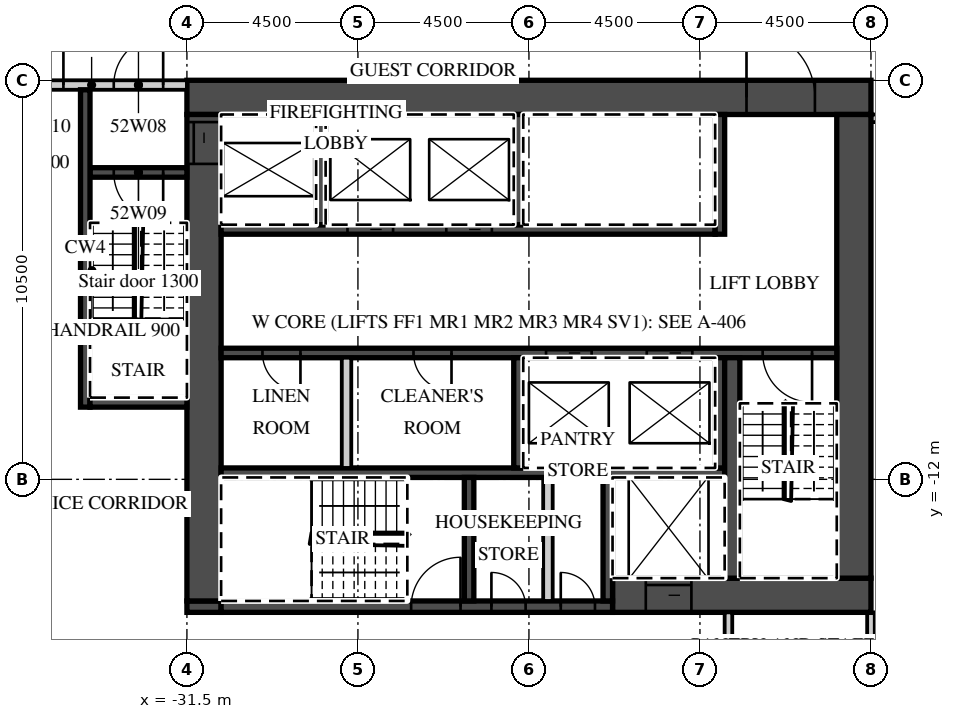
"""IFC4 building model, lengths in metres.
Left out: names, types, materials, properties, quantities, classifications, styles, units other than length and angle.
Written with IfcOpenShell. Run it as: python <this file> out.ifc"""

import sys

from ifc_helpers import new_model, si_unit, direction, frame, frame_2d, origin, place, context, subcontext, project, spatial, rectangle, extrude, element, fill, save


model = new_model("IFC4")
c1 = context("Model", 3, precision=1e-05, world=origin(), true_north=direction((0.0, 1.0)))
c2 = subcontext(c1, "Body", "Model", "MODEL_VIEW")
j1 = project(units=[si_unit("LENGTHUNIT", "METRE"), si_unit("PLANEANGLEUNIT", "RADIAN")], contexts=[c1])
p1 = place(None, origin())
s1 = spatial("IfcSite", under=j1, at=p1, CompositionType="ELEMENT")
p2 = place(p1, origin())
s2 = spatial("IfcBuilding", under=s1, at=p2, CompositionType="ELEMENT")
p3 = place(p2, frame((0.0, 0.0, 217.7)))
s3 = spatial("IfcBuildingStorey", under=s2, at=p3, CompositionType="ELEMENT", Elevation=217.7)
p4 = place(p3, frame((-13.5, -19.641, 0.0), z_axis=(0.0, 0.0, 1.0), x_axis=(0.0, 1.0, 0.0)))
e1 = element("IfcWall", 1, at=p4, inside=s3, PredefinedType="PARTITIONING", context=c2, shape_type="SweptSolid", body=[
    extrude(rectangle(XDim=4.141, YDim=0.2, at=frame_2d((2.071, 0.0))), origin(), (0.0, 0.0, 1.0), 3.02),
])
p5 = place(p3, frame((-13.5, -2.5, 0.0), z_axis=(0.0, 0.0, 1.0), x_axis=(1.0, 0.0, 0.0)))
e2 = element("IfcWall", 2, at=p5, inside=s3, PredefinedType="PARTITIONING", context=c2, shape_type="SweptSolid", body=[
    extrude(rectangle(XDim=27.0, YDim=0.2, at=frame_2d((13.5, 0.0))), origin(), (0.0, 0.0, 1.0), 3.02),
])
p6 = place(p5, frame((0.575, 0.0, 0.0)))
e3 = element("IfcOpeningElement", 3, at=p6, cuts=e2, PredefinedType="OPENING", context=c2, shape_type="SweptSolid", body=[
    extrude(rectangle(XDim=1.0, YDim=2.1, at=frame_2d((0.5, 1.05))), frame((0.0, 0.11, 0.0), z_axis=(0.0, -1.0, 0.0), x_axis=(1.0, 0.0, 0.0)), (0.0, 0.0, 1.0), 0.22),
])
p7 = place(p5, frame((6.938, 0.0, 0.0)))
e4 = element("IfcOpeningElement", 4, at=p7, cuts=e2, PredefinedType="OPENING", context=c2, shape_type="SweptSolid", body=[
    extrude(rectangle(XDim=1.2, YDim=2.1, at=frame_2d((0.6, 1.05))), frame((0.0, 0.11, 0.0), z_axis=(0.0, -1.0, 0.0), x_axis=(1.0, 0.0, 0.0)), (0.0, 0.0, 1.0), 0.22),
])
p8 = place(p5, frame((15.938, 0.0, 0.0)))
e5 = element("IfcOpeningElement", 5, at=p8, cuts=e2, PredefinedType="OPENING", context=c2, shape_type="SweptSolid", body=[
    extrude(rectangle(XDim=1.2, YDim=2.1, at=frame_2d((0.6, 1.05))), frame((0.0, 0.11, 0.0), z_axis=(0.0, -1.0, 0.0), x_axis=(1.0, 0.0, 0.0)), (0.0, 0.0, 1.0), 0.22),
])
p9 = place(p5, frame((25.425, 0.0, 0.0)))
e6 = element("IfcOpeningElement", 6, at=p9, cuts=e2, PredefinedType="OPENING", context=c2, shape_type="SweptSolid", body=[
    extrude(rectangle(XDim=1.0, YDim=2.1, at=frame_2d((0.5, 1.05))), frame((0.0, 0.11, 0.0), z_axis=(0.0, -1.0, 0.0), x_axis=(1.0, 0.0, 0.0)), (0.0, 0.0, 1.0), 0.22),
])
p10 = place(p3, frame((-31.5, -1.95, 0.0), z_axis=(0.0, 0.0, 1.0), x_axis=(1.0, 0.0, 0.0)))
e7 = element("IfcWall", 7, at=p10, inside=s3, PredefinedType="SHEAR", context=c2, shape_type="SweptSolid", body=[
    extrude(rectangle(XDim=18.0, YDim=0.9, at=frame_2d((9.0, 0.0))), origin(), (0.0, 0.0, 1.0), 3.02),
])
p11 = place(p10, frame((14.725, 0.0, 0.0)))
e8 = element("IfcOpeningElement", 8, at=p11, cuts=e7, PredefinedType="OPENING", context=c2, shape_type="SweptSolid", body=[
    extrude(rectangle(XDim=1.8, YDim=2.1, at=frame_2d((0.9, 1.05))), frame((0.0, 0.46, 0.0), z_axis=(0.0, -1.0, 0.0), x_axis=(1.0, 0.0, 0.0)), (0.0, 0.0, 1.0), 0.92),
])
p12 = place(p3, frame((-20.3, -15.05, 0.0), z_axis=(0.0, 0.0, 1.0), x_axis=(1.0, 0.0, 0.0)))
e9 = element("IfcWall", 9, at=p12, inside=s3, PredefinedType="SHEAR", context=c2, shape_type="SweptSolid", body=[
    extrude(rectangle(XDim=6.8, YDim=0.9, at=frame_2d((3.4, 0.0))), origin(), (0.0, 0.0, 1.0), 3.02),
])
p13 = place(p12, frame((0.875, 0.0, 0.0)))
e10 = element("IfcOpeningElement", 10, at=p13, cuts=e9, PredefinedType="OPENING", context=c2, shape_type="SweptSolid", body=[
    extrude(rectangle(XDim=1.2, YDim=2.1, at=frame_2d((0.6, 1.05))), frame((0.0, 0.46, 0.0), z_axis=(0.0, -1.0, 0.0), x_axis=(1.0, 0.0, 0.0)), (0.0, 0.0, 1.0), 0.92),
])
p14 = place(p3, frame((-31.5, -15.35, 0.0), z_axis=(0.0, 0.0, 1.0), x_axis=(1.0, 0.0, 0.0)))
e11 = element("IfcWall", 11, at=p14, inside=s3, PredefinedType="SHEAR", context=c2, shape_type="SweptSolid", body=[
    extrude(rectangle(XDim=0.9, YDim=0.3, at=frame_2d((0.45, 0.0))), origin(), (0.0, 0.0, 1.0), 3.02),
])
p15 = place(p3, frame((-30.6, -15.35, 0.0), z_axis=(0.0, 0.0, 1.0), x_axis=(1.0, 0.0, 0.0)))
e12 = element("IfcWall", 12, at=p15, inside=s3, PredefinedType="SHEAR", context=c2, shape_type="SweptSolid", body=[
    extrude(rectangle(XDim=10.3, YDim=0.3, at=frame_2d((5.15, 0.0))), origin(), (0.0, 0.0, 1.0), 3.02),
])
p16 = place(p15, frame((5.0, 0.0, 0.0)))
e13 = element("IfcOpeningElement", 13, at=p16, cuts=e12, PredefinedType="OPENING", context=c2, shape_type="SweptSolid", body=[
    extrude(rectangle(XDim=1.3, YDim=2.1, at=frame_2d((0.65, 1.05))), frame((0.0, 0.16, 0.0), z_axis=(0.0, -1.0, 0.0), x_axis=(1.0, 0.0, 0.0)), (0.0, 0.0, 1.0), 0.32),
])
p17 = place(p15, frame((7.113, 0.0, 0.0)))
e14 = element("IfcOpeningElement", 14, at=p17, cuts=e12, PredefinedType="OPENING", context=c2, shape_type="SweptSolid", body=[
    extrude(rectangle(XDim=0.9, YDim=2.1, at=frame_2d((0.45, 1.05))), frame((0.0, 0.16, 0.0), z_axis=(0.0, -1.0, 0.0), x_axis=(1.0, 0.0, 0.0)), (0.0, 0.0, 1.0), 0.32),
])
p18 = place(p15, frame((8.938, 0.0, 0.0)))
e15 = element("IfcOpeningElement", 15, at=p18, cuts=e12, PredefinedType="OPENING", context=c2, shape_type="SweptSolid", body=[
    extrude(rectangle(XDim=0.9, YDim=2.1, at=frame_2d((0.45, 1.05))), frame((0.0, 0.16, 0.0), z_axis=(0.0, -1.0, 0.0), x_axis=(1.0, 0.0, 0.0)), (0.0, 0.0, 1.0), 0.32),
])
p19 = place(p3, frame((-31.05, -15.2, 0.0), z_axis=(0.0, 0.0, 1.0), x_axis=(0.0, 1.0, 0.0)))
e16 = element("IfcWall", 16, at=p19, inside=s3, PredefinedType="SHEAR", context=c2, shape_type="SweptSolid", body=[
    extrude(rectangle(XDim=12.8, YDim=0.9, at=frame_2d((6.4, 0.0))), origin(), (0.0, 0.0, 1.0), 3.02),
])
p20 = place(p19, frame((11.5, 0.0, 0.0)))
e17 = element("IfcOpeningElement", 17, at=p20, cuts=e16, PredefinedType="OPENING", context=c2, shape_type="SweptSolid", body=[
    extrude(rectangle(XDim=1.1, YDim=2.1, at=frame_2d((0.55, 1.05))), frame((0.0, 0.46, 0.0), z_axis=(0.0, -1.0, 0.0), x_axis=(1.0, 0.0, 0.0)), (0.0, 0.0, 1.0), 0.92),
])
p21 = place(p3, frame((-13.95, -14.6, 0.0), z_axis=(0.0, 0.0, 1.0), x_axis=(0.0, 1.0, 0.0)))
e18 = element("IfcWall", 18, at=p21, inside=s3, PredefinedType="SHEAR", context=c2, shape_type="SweptSolid", body=[
    extrude(rectangle(XDim=12.2, YDim=0.9, at=frame_2d((6.1, 0.0))), origin(), (0.0, 0.0, 1.0), 3.02),
])
p22 = place(p3, frame((-30.6, -5.425, 0.0), z_axis=(0.0, 0.0, 1.0), x_axis=(1.0, 0.0, 0.0)))
e19 = element("IfcWall", 19, at=p22, inside=s3, PredefinedType="SHEAR", context=c2, shape_type="SweptSolid", body=[
    extrude(rectangle(XDim=13.0, YDim=0.25, at=frame_2d((6.5, 0.0))), origin(), (0.0, 0.0, 1.0), 3.02),
])
p23 = place(p22, frame((3.325, 0.0, 0.0)))
e20 = element("IfcOpeningElement", 20, at=p23, cuts=e19, PredefinedType="OPENING", context=c2, shape_type="SweptSolid", body=[
    extrude(rectangle(XDim=1.2, YDim=2.1, at=frame_2d((0.6, 1.05))), frame((0.0, 0.135, 0.0), z_axis=(0.0, -1.0, 0.0), x_axis=(1.0, 0.0, 0.0)), (0.0, 0.0, 1.0), 0.27),
])
p24 = place(p22, frame((5.925, 0.0, 0.0)))
e21 = element("IfcOpeningElement", 21, at=p24, cuts=e19, PredefinedType="OPENING", context=c2, shape_type="SweptSolid", body=[
    extrude(rectangle(XDim=1.2, YDim=2.1, at=frame_2d((0.6, 1.05))), frame((0.0, 0.135, 0.0), z_axis=(0.0, -1.0, 0.0), x_axis=(1.0, 0.0, 0.0)), (0.0, 0.0, 1.0), 0.27),
])
p25 = place(p3, frame((-17.475, -5.55, 0.0), z_axis=(0.0, 0.0, 1.0), x_axis=(0.0, 1.0, 0.0)))
e22 = element("IfcWall", 22, at=p25, inside=s3, PredefinedType="SHEAR", context=c2, shape_type="SweptSolid", body=[
    extrude(rectangle(XDim=3.15, YDim=0.25, at=frame_2d((1.575, 0.0))), origin(), (0.0, 0.0, 1.0), 3.02),
])
for number, where, z_axis, x_axis in (
    (23, (-27.975, -5.3, 0.0), (0.0, 0.0, 1.0), (0.0, 1.0, 0.0)),
    (24, (-22.775, -5.3, 0.0), (0.0, 0.0, 1.0), (0.0, 1.0, 0.0)),
):
    element("IfcWall", number, at=place(p3, frame(where, z_axis=z_axis, x_axis=x_axis)), inside=s3, PredefinedType="SHEAR", context=c2, shape_type="SweptSolid", body=[
        extrude(rectangle(XDim=2.9, YDim=0.25, at=frame_2d((1.45, 0.0))), origin(), (0.0, 0.0, 1.0), 3.02),
    ])
p26 = place(p3, frame((-30.6, -8.675, 0.0), z_axis=(0.0, 0.0, 1.0), x_axis=(1.0, 0.0, 0.0)))
e25 = element("IfcWall", 25, at=p26, inside=s3, PredefinedType="SHEAR", context=c2, shape_type="SweptSolid", body=[
    extrude(rectangle(XDim=16.2, YDim=0.25, at=frame_2d((8.1, 0.0))), origin(), (0.0, 0.0, 1.0), 3.02),
])
p27 = place(p26, frame((8.55, 0.0, 0.0)))
e26 = element("IfcOpeningElement", 26, at=p27, cuts=e25, PredefinedType="OPENING", context=c2, shape_type="SweptSolid", body=[
    extrude(rectangle(XDim=1.2, YDim=2.1, at=frame_2d((0.6, 1.05))), frame((0.0, 0.135, 0.0), z_axis=(0.0, -1.0, 0.0), x_axis=(1.0, 0.0, 0.0)), (0.0, 0.0, 1.0), 0.27),
])
p28 = place(p26, frame((11.2, 0.0, 0.0)))
e27 = element("IfcOpeningElement", 27, at=p28, cuts=e25, PredefinedType="OPENING", context=c2, shape_type="SweptSolid", body=[
    extrude(rectangle(XDim=1.2, YDim=2.1, at=frame_2d((0.6, 1.05))), frame((0.0, 0.135, 0.0), z_axis=(0.0, -1.0, 0.0), x_axis=(1.0, 0.0, 0.0)), (0.0, 0.0, 1.0), 0.27),
])
p29 = place(p26, frame((14.25, 0.0, 0.0)))
e28 = element("IfcOpeningElement", 28, at=p29, cuts=e25, PredefinedType="OPENING", context=c2, shape_type="SweptSolid", body=[
    extrude(rectangle(XDim=1.3, YDim=2.1, at=frame_2d((0.65, 1.05))), frame((0.0, 0.135, 0.0), z_axis=(0.0, -1.0, 0.0), x_axis=(1.0, 0.0, 0.0)), (0.0, 0.0, 1.0), 0.27),
])
p30 = place(p26, frame((1.087, 0.0, 0.0)))
e29 = element("IfcOpeningElement", 29, at=p30, cuts=e25, PredefinedType="OPENING", context=c2, shape_type="SweptSolid", body=[
    extrude(rectangle(XDim=1.0, YDim=2.1, at=frame_2d((0.5, 1.05))), frame((0.0, 0.135, 0.0), z_axis=(0.0, -1.0, 0.0), x_axis=(1.0, 0.0, 0.0)), (0.0, 0.0, 1.0), 0.27),
])
p31 = place(p26, frame((5.062, 0.0, 0.0)))
e30 = element("IfcOpeningElement", 30, at=p31, cuts=e25, PredefinedType="OPENING", context=c2, shape_type="SweptSolid", body=[
    extrude(rectangle(XDim=1.0, YDim=2.1, at=frame_2d((0.5, 1.05))), frame((0.0, 0.135, 0.0), z_axis=(0.0, -1.0, 0.0), x_axis=(1.0, 0.0, 0.0)), (0.0, 0.0, 1.0), 0.27),
])
p32 = place(p3, frame((-30.6, -11.825, 0.0), z_axis=(0.0, 0.0, 1.0), x_axis=(1.0, 0.0, 0.0)))
e31 = element("IfcWall", 31, at=p32, inside=s3, PredefinedType="SHEAR", context=c2, shape_type="SweptSolid", body=[
    extrude(rectangle(XDim=13.25, YDim=0.25, at=frame_2d((6.625, 0.0))), origin(), (0.0, 0.0, 1.0), 3.02),
])
for number, where, z_axis, x_axis in (
    (32, (-17.475, -11.7, 0.0), (0.0, 0.0, 1.0), (0.0, 1.0, 0.0)),
    (33, (-22.775, -11.7, 0.0), (0.0, 0.0, 1.0), (0.0, 1.0, 0.0)),
):
    element("IfcWall", number, at=place(p3, frame(where, z_axis=z_axis, x_axis=x_axis)), inside=s3, PredefinedType="SHEAR", context=c2, shape_type="SweptSolid", body=[
        extrude(rectangle(XDim=2.9, YDim=0.25, at=frame_2d((1.45, 0.0))), origin(), (0.0, 0.0, 1.0), 3.02),
    ])
p33 = place(p3, frame((-27.3, -11.7, 0.0), z_axis=(0.0, 0.0, 1.0), x_axis=(0.0, 1.0, 0.0)))
e34 = element("IfcWall", 34, at=p33, inside=s3, PredefinedType="PARTITIONING", context=c2, shape_type="SweptSolid", body=[
    extrude(rectangle(XDim=2.9, YDim=0.25, at=frame_2d((1.45, 0.0))), origin(), (0.0, 0.0, 1.0), 3.02),
])
p34 = place(p3, frame((-17.15, -14.6, 0.0), z_axis=(0.0, 0.0, 1.0), x_axis=(0.0, 1.0, 0.0)))
e35 = element("IfcWall", 35, at=p34, inside=s3, PredefinedType="SHEAR", context=c2, shape_type="SweptSolid", body=[
    extrude(rectangle(XDim=5.8, YDim=0.4, at=frame_2d((2.9, 0.0))), origin(), (0.0, 0.0, 1.0), 3.02),
])
for number, where, z_axis, x_axis in (
    (36, (-20.425, -15.2, 0.0), (0.0, 0.0, 1.0), (0.0, 1.0, 0.0)),
    (37, (-24.075, -15.2, 0.0), (0.0, 0.0, 1.0), (0.0, 1.0, 0.0)),
):
    element("IfcWall", number, at=place(p3, frame(where, z_axis=z_axis, x_axis=x_axis)), inside=s3, PredefinedType="SHEAR", context=c2, shape_type="SweptSolid", body=[
        extrude(rectangle(XDim=3.25, YDim=0.25, at=frame_2d((1.625, 0.0))), origin(), (0.0, 0.0, 1.0), 3.02),
    ])
p35 = place(p3, frame((-22.0, -15.2, 0.0), z_axis=(0.0, 0.0, 1.0), x_axis=(0.0, 1.0, 0.0)))
e38 = element("IfcWall", 38, at=p35, inside=s3, PredefinedType="PARTITIONING", context=c2, shape_type="SweptSolid", body=[
    extrude(rectangle(XDim=3.25, YDim=0.25, at=frame_2d((1.625, 0.0))), origin(), (0.0, 0.0, 1.0), 3.02),
])
p36 = place(p3, frame((-36.515, -1.625, 0.0), z_axis=(0.0, 0.0, 1.0), x_axis=(1.0, 0.0, 0.0)))
e39 = element("IfcWall", 39, at=p36, inside=s3, PredefinedType="PARTITIONING", context=c2, shape_type="SweptSolid", body=[
    extrude(rectangle(XDim=5.015, YDim=0.25, at=frame_2d((2.508, 0.0))), origin(), (0.0, 0.0, 1.0), 3.02),
])
p37 = place(p36, frame((3.09, 0.0, 0.0)))
e40 = element("IfcOpeningElement", 40, at=p37, cuts=e39, PredefinedType="OPENING", context=c2, shape_type="SweptSolid", body=[
    extrude(rectangle(XDim=1.3, YDim=2.1, at=frame_2d((0.65, 1.05))), frame((0.0, 0.135, 0.0), z_axis=(0.0, -1.0, 0.0), x_axis=(1.0, 0.0, 0.0)), (0.0, 0.0, 1.0), 0.27),
])
p38 = place(p36, frame((0.665, 0.0, 0.0)))
e41 = element("IfcOpeningElement", 41, at=p38, cuts=e39, PredefinedType="OPENING", context=c2, shape_type="SweptSolid", body=[
    extrude(rectangle(XDim=1.1, YDim=2.1, at=frame_2d((0.55, 1.05))), frame((0.0, 0.135, 0.0), z_axis=(0.0, -1.0, 0.0), x_axis=(1.0, 0.0, 0.0)), (0.0, 0.0, 1.0), 0.27),
])
p39 = place(p3, frame((-34.05, -3.925, 0.0), z_axis=(0.0, 0.0, 1.0), x_axis=(1.0, 0.0, 0.0)))
e42 = element("IfcWall", 42, at=p39, inside=s3, PredefinedType="SHEAR", context=c2, shape_type="SweptSolid", body=[
    extrude(rectangle(XDim=2.55, YDim=0.25, at=frame_2d((1.275, 0.0))), origin(), (0.0, 0.0, 1.0), 3.02),
])
p40 = place(p39, frame((0.625, 0.0, 0.0)))
e43 = element("IfcOpeningElement", 43, at=p40, cuts=e42, PredefinedType="OPENING", context=c2, shape_type="SweptSolid", body=[
    extrude(rectangle(XDim=1.3, YDim=2.1, at=frame_2d((0.65, 1.05))), frame((0.0, 0.135, 0.0), z_axis=(0.0, -1.0, 0.0), x_axis=(1.0, 0.0, 0.0)), (0.0, 0.0, 1.0), 0.27),
])
p41 = place(p3, frame((-34.175, -10.1, 0.0), z_axis=(0.0, 0.0, 1.0), x_axis=(0.0, 1.0, 0.0)))
e44 = element("IfcWall", 44, at=p41, inside=s3, PredefinedType="SHEAR", context=c2, shape_type="SweptSolid", body=[
    extrude(rectangle(XDim=8.35, YDim=0.25, at=frame_2d((4.175, 0.0))), origin(), (0.0, 0.0, 1.0), 3.02),
])
p42 = place(p3, frame((-34.05, -9.975, 0.0), z_axis=(0.0, 0.0, 1.0), x_axis=(1.0, 0.0, 0.0)))
e45 = element("IfcWall", 45, at=p42, inside=s3, PredefinedType="SHEAR", context=c2, shape_type="SweptSolid", body=[
    extrude(rectangle(XDim=2.55, YDim=0.25, at=frame_2d((1.275, 0.0))), origin(), (0.0, 0.0, 1.0), 3.02),
])
p43 = place(p3, frame((-17.25, -17.7, 0.0), z_axis=(0.0, 0.0, 1.0), x_axis=(0.0, 1.0, 0.0)))
e46 = element("IfcWall", 46, at=p43, inside=s3, PredefinedType="PARTITIONING", context=c2, shape_type="SweptSolid", body=[
    extrude(rectangle(XDim=2.2, YDim=0.2, at=frame_2d((1.1, 0.0))), origin(), (0.0, 0.0, 1.0), 3.02),
])
p44 = place(p27, origin())
e47 = element("IfcDoor", 47, at=p44, inside=s3, OperationType="SLIDING_TO_LEFT", PredefinedType="DOOR", context=c2, shape_type="SweptSolid", body=[
    extrude(rectangle(XDim=1.2, YDim=2.1, at=frame_2d((0.6, 1.05))), frame((0.0, 0.025, 0.0), z_axis=(0.0, -1.0, 0.0), x_axis=(1.0, 0.0, 0.0)), (0.0, 0.0, 1.0), 0.05),
])
fill(e26, e47)
p45 = place(p28, origin())
e48 = element("IfcDoor", 48, at=p45, inside=s3, OperationType="SLIDING_TO_RIGHT", PredefinedType="DOOR", context=c2, shape_type="SweptSolid", body=[
    extrude(rectangle(XDim=1.2, YDim=2.1, at=frame_2d((0.6, 1.05))), frame((0.0, 0.025, 0.0), z_axis=(0.0, -1.0, 0.0), x_axis=(1.0, 0.0, 0.0)), (0.0, 0.0, 1.0), 0.05),
])
fill(e27, e48)
p46 = place(p23, origin())
e49 = element("IfcDoor", 49, at=p46, inside=s3, OperationType="SLIDING_TO_RIGHT", PredefinedType="DOOR", context=c2, shape_type="SweptSolid", body=[
    extrude(rectangle(XDim=1.2, YDim=2.1, at=frame_2d((0.6, 1.05))), frame((0.0, 0.025, 0.0), z_axis=(0.0, -1.0, 0.0), x_axis=(1.0, 0.0, 0.0)), (0.0, 0.0, 1.0), 0.05),
])
fill(e20, e49)
p47 = place(p24, origin())
e50 = element("IfcDoor", 50, at=p47, inside=s3, OperationType="SLIDING_TO_RIGHT", PredefinedType="DOOR", context=c2, shape_type="SweptSolid", body=[
    extrude(rectangle(XDim=1.2, YDim=2.1, at=frame_2d((0.6, 1.05))), frame((0.0, 0.025, 0.0), z_axis=(0.0, -1.0, 0.0), x_axis=(1.0, 0.0, 0.0)), (0.0, 0.0, 1.0), 0.05),
])
fill(e21, e50)
p48 = place(p13, origin())
e51 = element("IfcDoor", 51, at=p48, inside=s3, OperationType="SLIDING_TO_LEFT", PredefinedType="DOOR", context=c2, shape_type="SweptSolid", body=[
    extrude(rectangle(XDim=1.2, YDim=2.1, at=frame_2d((0.6, 1.05))), frame((0.0, 0.025, 0.0), z_axis=(0.0, -1.0, 0.0), x_axis=(1.0, 0.0, 0.0)), (0.0, 0.0, 1.0), 0.05),
])
fill(e10, e51)
p49 = place(p20, origin())
e52 = element("IfcDoor", 52, at=p49, inside=s3, OperationType="SLIDING_TO_RIGHT", PredefinedType="DOOR", context=c2, shape_type="SweptSolid", body=[
    extrude(rectangle(XDim=1.1, YDim=2.1, at=frame_2d((0.55, 1.05))), frame((0.0, 0.025, 0.0), z_axis=(0.0, -1.0, 0.0), x_axis=(1.0, 0.0, 0.0)), (0.0, 0.0, 1.0), 0.05),
])
fill(e17, e52)
p50 = place(p11, origin())
e53 = element("IfcDoor", 53, at=p50, inside=s3, OperationType="DOUBLE_DOOR_DOUBLE_SWING", PredefinedType="DOOR", context=c2, shape_type="SweptSolid", body=[
    extrude(rectangle(XDim=1.8, YDim=2.1, at=frame_2d((0.9, 1.05))), frame((0.0, 0.025, 0.0), z_axis=(0.0, -1.0, 0.0), x_axis=(1.0, 0.0, 0.0)), (0.0, 0.0, 1.0), 0.05),
])
fill(e8, e53)
p51 = place(p37, origin())
e54 = element("IfcDoor", 54, at=p51, inside=s3, OperationType="SINGLE_SWING_RIGHT", PredefinedType="DOOR", context=c2, shape_type="SweptSolid", body=[
    extrude(rectangle(XDim=1.3, YDim=2.1, at=frame_2d((0.65, 1.05))), frame((0.0, 0.025, 0.0), z_axis=(0.0, -1.0, 0.0), x_axis=(1.0, 0.0, 0.0)), (0.0, 0.0, 1.0), 0.05),
])
fill(e40, e54)
p52 = place(p40, origin())
e55 = element("IfcDoor", 55, at=p52, inside=s3, OperationType="SINGLE_SWING_RIGHT", PredefinedType="DOOR", context=c2, shape_type="SweptSolid", body=[
    extrude(rectangle(XDim=1.3, YDim=2.1, at=frame_2d((0.65, 1.05))), frame((0.0, 0.025, 0.0), z_axis=(0.0, -1.0, 0.0), x_axis=(1.0, 0.0, 0.0)), (0.0, 0.0, 1.0), 0.05),
])
fill(e43, e55)
p53 = place(p38, origin())
e56 = element("IfcDoor", 56, at=p53, inside=s3, OperationType="SINGLE_SWING_RIGHT", PredefinedType="DOOR", context=c2, shape_type="SweptSolid", body=[
    extrude(rectangle(XDim=1.1, YDim=2.1, at=frame_2d((0.55, 1.05))), frame((0.0, 0.025, 0.0), z_axis=(0.0, -1.0, 0.0), x_axis=(1.0, 0.0, 0.0)), (0.0, 0.0, 1.0), 0.05),
])
fill(e41, e56)
p54 = place(p29, origin())
e57 = element("IfcDoor", 57, at=p54, inside=s3, OperationType="SINGLE_SWING_RIGHT", PredefinedType="DOOR", context=c2, shape_type="SweptSolid", body=[
    extrude(rectangle(XDim=1.3, YDim=2.1, at=frame_2d((0.65, 1.05))), frame((0.0, 0.025, 0.0), z_axis=(0.0, -1.0, 0.0), x_axis=(1.0, 0.0, 0.0)), (0.0, 0.0, 1.0), 0.05),
])
fill(e28, e57)
p55 = place(p16, origin())
e58 = element("IfcDoor", 58, at=p55, inside=s3, OperationType="SINGLE_SWING_RIGHT", PredefinedType="DOOR", context=c2, shape_type="SweptSolid", body=[
    extrude(rectangle(XDim=1.3, YDim=2.1, at=frame_2d((0.65, 1.05))), frame((0.0, 0.025, 0.0), z_axis=(0.0, -1.0, 0.0), x_axis=(1.0, 0.0, 0.0)), (0.0, 0.0, 1.0), 0.05),
])
fill(e13, e58)
p56 = place(p17, origin())
e59 = element("IfcDoor", 59, at=p56, inside=s3, OperationType="SINGLE_SWING_LEFT", PredefinedType="DOOR", context=c2, shape_type="SweptSolid", body=[
    extrude(rectangle(XDim=0.9, YDim=2.1, at=frame_2d((0.45, 1.05))), frame((0.0, 0.025, 0.0), z_axis=(0.0, -1.0, 0.0), x_axis=(1.0, 0.0, 0.0)), (0.0, 0.0, 1.0), 0.05),
])
fill(e14, e59)
p57 = place(p18, origin())
e60 = element("IfcDoor", 60, at=p57, inside=s3, OperationType="SINGLE_SWING_LEFT", PredefinedType="DOOR", context=c2, shape_type="SweptSolid", body=[
    extrude(rectangle(XDim=0.9, YDim=2.1, at=frame_2d((0.45, 1.05))), frame((0.0, 0.025, 0.0), z_axis=(0.0, -1.0, 0.0), x_axis=(1.0, 0.0, 0.0)), (0.0, 0.0, 1.0), 0.05),
])
fill(e15, e60)
p58 = place(p30, origin())
e61 = element("IfcDoor", 61, at=p58, inside=s3, OperationType="SINGLE_SWING_RIGHT", PredefinedType="DOOR", context=c2, shape_type="SweptSolid", body=[
    extrude(rectangle(XDim=1.0, YDim=2.1, at=frame_2d((0.5, 1.05))), frame((0.0, 0.025, 0.0), z_axis=(0.0, -1.0, 0.0), x_axis=(1.0, 0.0, 0.0)), (0.0, 0.0, 1.0), 0.05),
])
fill(e29, e61)
p59 = place(p31, origin())
e62 = element("IfcDoor", 62, at=p59, inside=s3, OperationType="SINGLE_SWING_RIGHT", PredefinedType="DOOR", context=c2, shape_type="SweptSolid", body=[
    extrude(rectangle(XDim=1.0, YDim=2.1, at=frame_2d((0.5, 1.05))), frame((0.0, 0.025, 0.0), z_axis=(0.0, -1.0, 0.0), x_axis=(1.0, 0.0, 0.0)), (0.0, 0.0, 1.0), 0.05),
])
fill(e30, e62)
save(model, sys.argv[1])
